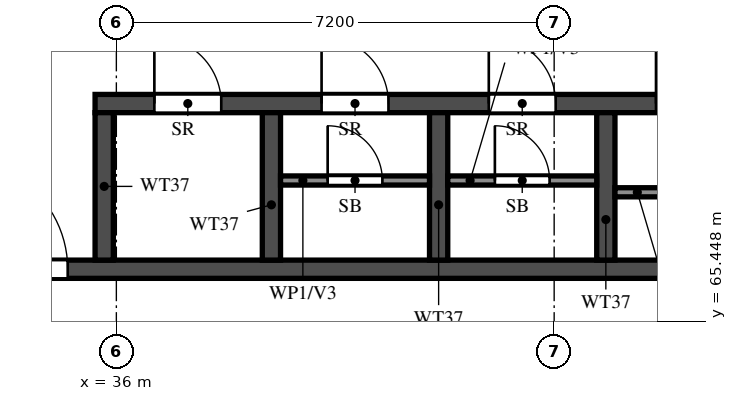
"""IFC4 building model, lengths in metres.
Left out: names, types, materials, properties, quantities, classifications, styles, units other than length and angle.
Written with IfcOpenShell. Run it as: python <this file> out.ifc"""

import sys

from ifc_helpers import new_model, si_unit, direction, frame, frame_2d, origin, place, context, subcontext, project, spatial, rectangle, extrude, element, fill, save


model = new_model("IFC4")
c1 = context("Model", 3, precision=1e-05, world=origin(), true_north=direction((0.0, 1.0)))
c2 = subcontext(c1, "Body", "Model", "MODEL_VIEW")
j1 = project(units=[si_unit("LENGTHUNIT", "METRE"), si_unit("PLANEANGLEUNIT", "RADIAN")], contexts=[c1])
p1 = place(None, origin())
s1 = spatial("IfcSite", under=j1, at=p1, CompositionType="ELEMENT")
p2 = place(p1, origin())
s2 = spatial("IfcBuilding", under=s1, at=p2, CompositionType="ELEMENT")
p3 = place(p2, frame((0.0, 0.0, 260.5)))
s3 = spatial("IfcBuildingStorey", under=s2, at=p3, CompositionType="ELEMENT", Elevation=260.5)
p4 = place(p3, frame((29.2, 66.3, 0.0), z_axis=(0.0, 0.0, 1.0), x_axis=(1.0, 0.0, 0.0)))
e1 = element("IfcWall", 1, at=p4, inside=s3, PredefinedType="SHEAR", context=c2, shape_type="SweptSolid", body=[
    extrude(rectangle(XDim=42.4, YDim=0.3, at=frame_2d((21.2, 0.0))), origin(), (0.0, 0.0, 1.0), 3.22),
])
p5 = place(p4, frame((1.425, 0.0, 0.0)))
e2 = element("IfcOpeningElement", 2, at=p5, cuts=e1, PredefinedType="OPENING", context=c2, shape_type="SweptSolid", body=[
    extrude(rectangle(XDim=1.1, YDim=2.1, at=frame_2d((0.55, 1.05))), frame((0.0, 0.16, 0.0), z_axis=(0.0, -1.0, 0.0), x_axis=(1.0, 0.0, 0.0)), (0.0, 0.0, 1.0), 0.32),
])
p6 = place(p4, frame((4.2, 0.0, 0.0)))
e3 = element("IfcOpeningElement", 3, at=p6, cuts=e1, PredefinedType="OPENING", context=c2, shape_type="SweptSolid", body=[
    extrude(rectangle(XDim=1.8, YDim=2.1, at=frame_2d((0.9, 1.05))), frame((0.0, 0.16, 0.0), z_axis=(0.0, -1.0, 0.0), x_axis=(1.0, 0.0, 0.0)), (0.0, 0.0, 1.0), 0.32),
])
p7 = place(p3, frame((35.65, 69.025, 0.0), z_axis=(0.0, 0.0, 1.0), x_axis=(1.0, 0.0, 0.0)))
e4 = element("IfcWall", 4, at=p7, inside=s3, PredefinedType="SHEAR", context=c2, shape_type="SweptSolid", body=[
    extrude(rectangle(XDim=24.05, YDim=0.3, at=frame_2d((12.025, 0.0))), origin(), (0.0, 0.0, 1.0), 3.22),
])
p8 = place(p7, frame((0.975, 0.0, 0.0)))
e5 = element("IfcOpeningElement", 5, at=p8, cuts=e4, PredefinedType="OPENING", context=c2, shape_type="SweptSolid", body=[
    extrude(rectangle(XDim=1.1, YDim=2.1, at=frame_2d((0.55, 1.05))), frame((0.0, 0.16, 0.0), z_axis=(0.0, -1.0, 0.0), x_axis=(1.0, 0.0, 0.0)), (0.0, 0.0, 1.0), 0.32),
])
p9 = place(p7, frame((3.725, 0.0, 0.0)))
e6 = element("IfcOpeningElement", 6, at=p9, cuts=e4, PredefinedType="OPENING", context=c2, shape_type="SweptSolid", body=[
    extrude(rectangle(XDim=1.1, YDim=2.1, at=frame_2d((0.55, 1.05))), frame((0.0, 0.16, 0.0), z_axis=(0.0, -1.0, 0.0), x_axis=(1.0, 0.0, 0.0)), (0.0, 0.0, 1.0), 0.32),
])
p10 = place(p7, frame((6.475, 0.0, 0.0)))
e7 = element("IfcOpeningElement", 7, at=p10, cuts=e4, PredefinedType="OPENING", context=c2, shape_type="SweptSolid", body=[
    extrude(rectangle(XDim=1.1, YDim=2.1, at=frame_2d((0.55, 1.05))), frame((0.0, 0.16, 0.0), z_axis=(0.0, -1.0, 0.0), x_axis=(1.0, 0.0, 0.0)), (0.0, 0.0, 1.0), 0.32),
])
p11 = place(p7, frame((9.225, 0.0, 0.0)))
e8 = element("IfcOpeningElement", 8, at=p11, cuts=e4, PredefinedType="OPENING", context=c2, shape_type="SweptSolid", body=[
    extrude(rectangle(XDim=1.1, YDim=2.1, at=frame_2d((0.55, 1.05))), frame((0.0, 0.16, 0.0), z_axis=(0.0, -1.0, 0.0), x_axis=(1.0, 0.0, 0.0)), (0.0, 0.0, 1.0), 0.32),
])
p12 = place(p7, frame((11.975, 0.0, 0.0)))
e9 = element("IfcOpeningElement", 9, at=p12, cuts=e4, PredefinedType="OPENING", context=c2, shape_type="SweptSolid", body=[
    extrude(rectangle(XDim=1.1, YDim=2.1, at=frame_2d((0.55, 1.05))), frame((0.0, 0.16, 0.0), z_axis=(0.0, -1.0, 0.0), x_axis=(1.0, 0.0, 0.0)), (0.0, 0.0, 1.0), 0.32),
])
p13 = place(p7, frame((14.725, 0.0, 0.0)))
e10 = element("IfcOpeningElement", 10, at=p13, cuts=e4, PredefinedType="OPENING", context=c2, shape_type="SweptSolid", body=[
    extrude(rectangle(XDim=1.1, YDim=2.1, at=frame_2d((0.55, 1.05))), frame((0.0, 0.16, 0.0), z_axis=(0.0, -1.0, 0.0), x_axis=(1.0, 0.0, 0.0)), (0.0, 0.0, 1.0), 0.32),
])
p14 = place(p7, frame((17.6, 0.0, 0.0)))
e11 = element("IfcOpeningElement", 11, at=p14, cuts=e4, PredefinedType="OPENING", context=c2, shape_type="SweptSolid", body=[
    extrude(rectangle(XDim=1.1, YDim=2.1, at=frame_2d((0.55, 1.05))), frame((0.0, 0.16, 0.0), z_axis=(0.0, -1.0, 0.0), x_axis=(1.0, 0.0, 0.0)), (0.0, 0.0, 1.0), 0.32),
])
p15 = place(p7, frame((20.6, 0.0, 0.0)))
e12 = element("IfcOpeningElement", 12, at=p15, cuts=e4, PredefinedType="OPENING", context=c2, shape_type="SweptSolid", body=[
    extrude(rectangle(XDim=1.1, YDim=2.1, at=frame_2d((0.55, 1.05))), frame((0.0, 0.16, 0.0), z_axis=(0.0, -1.0, 0.0), x_axis=(1.0, 0.0, 0.0)), (0.0, 0.0, 1.0), 0.32),
])
for number, where, z_axis, x_axis in (
    (13, (35.8, 66.45, 0.0), (0.0, 0.0, 1.0), (0.0, 1.0, 0.0)),
    (14, (38.55, 66.45, 0.0), (0.0, 0.0, 1.0), (0.0, 1.0, 0.0)),
    (15, (41.3, 66.45, 0.0), (0.0, 0.0, 1.0), (0.0, 1.0, 0.0)),
    (16, (44.05, 66.45, 0.0), (0.0, 0.0, 1.0), (0.0, 1.0, 0.0)),
):
    element("IfcWall", number, at=place(p3, frame(where, z_axis=z_axis, x_axis=x_axis)), inside=s3, PredefinedType="SHEAR", context=c2, shape_type="SweptSolid", body=[
        extrude(rectangle(XDim=2.425, YDim=0.3, at=frame_2d((1.212, 0.0))), origin(), (0.0, 0.0, 1.0), 3.22),
    ])
p16 = place(p3, frame((38.7, 67.76, 0.0), z_axis=(0.0, 0.0, 1.0), x_axis=(1.0, 0.0, 0.0)))
e17 = element("IfcWall", 17, at=p16, inside=s3, PredefinedType="PARTITIONING", context=c2, shape_type="SweptSolid", body=[
    extrude(rectangle(XDim=2.45, YDim=0.15, at=frame_2d((1.225, 0.0))), origin(), (0.0, 0.0, 1.0), 3.22),
])
p17 = place(p16, frame((0.775, 0.0, 0.0)))
e18 = element("IfcOpeningElement", 18, at=p17, cuts=e17, PredefinedType="OPENING", context=c2, shape_type="SweptSolid", body=[
    extrude(rectangle(XDim=0.9, YDim=2.1, at=frame_2d((0.45, 1.05))), frame((0.0, 0.085, 0.0), z_axis=(0.0, -1.0, 0.0), x_axis=(1.0, 0.0, 0.0)), (0.0, 0.0, 1.0), 0.17),
])
p18 = place(p3, frame((41.45, 67.76, 0.0), z_axis=(0.0, 0.0, 1.0), x_axis=(1.0, 0.0, 0.0)))
e19 = element("IfcWall", 19, at=p18, inside=s3, PredefinedType="PARTITIONING", context=c2, shape_type="SweptSolid", body=[
    extrude(rectangle(XDim=2.45, YDim=0.15, at=frame_2d((1.225, 0.0))), origin(), (0.0, 0.0, 1.0), 3.22),
])
p19 = place(p18, frame((0.775, 0.0, 0.0)))
e20 = element("IfcOpeningElement", 20, at=p19, cuts=e19, PredefinedType="OPENING", context=c2, shape_type="SweptSolid", body=[
    extrude(rectangle(XDim=0.9, YDim=2.1, at=frame_2d((0.45, 1.05))), frame((0.0, 0.085, 0.0), z_axis=(0.0, -1.0, 0.0), x_axis=(1.0, 0.0, 0.0)), (0.0, 0.0, 1.0), 0.17),
])
p20 = place(p3, frame((44.2, 67.565, 0.0), z_axis=(0.0, 0.0, 1.0), x_axis=(1.0, 0.0, 0.0)))
e21 = element("IfcWall", 21, at=p20, inside=s3, PredefinedType="PARTITIONING", context=c2, shape_type="SweptSolid", body=[
    extrude(rectangle(XDim=2.45, YDim=0.15, at=frame_2d((1.225, 0.0))), origin(), (0.0, 0.0, 1.0), 3.22),
])
p21 = place(p20, frame((0.775, 0.0, 0.0)))
e22 = element("IfcOpeningElement", 22, at=p21, cuts=e21, PredefinedType="OPENING", context=c2, shape_type="SweptSolid", body=[
    extrude(rectangle(XDim=0.9, YDim=2.1, at=frame_2d((0.45, 1.05))), frame((0.0, 0.085, 0.0), z_axis=(0.0, -1.0, 0.0), x_axis=(1.0, 0.0, 0.0)), (0.0, 0.0, 1.0), 0.17),
])
p22 = place(p6, origin())
e23 = element("IfcDoor", 23, at=p22, inside=s3, OperationType="DOUBLE_DOOR_SINGLE_SWING", PredefinedType="DOOR", context=c2, shape_type="SweptSolid", body=[
    extrude(rectangle(XDim=1.8, YDim=2.1, at=frame_2d((0.9, 1.05))), frame((0.0, 0.025, 0.0), z_axis=(0.0, -1.0, 0.0), x_axis=(1.0, 0.0, 0.0)), (0.0, 0.0, 1.0), 0.05),
])
fill(e3, e23)
p23 = place(p8, origin())
e24 = element("IfcDoor", 24, at=p23, inside=s3, OperationType="SINGLE_SWING_RIGHT", PredefinedType="DOOR", context=c2, shape_type="SweptSolid", body=[
    extrude(rectangle(XDim=1.1, YDim=2.1, at=frame_2d((0.55, 1.05))), frame((0.0, 0.025, 0.0), z_axis=(0.0, -1.0, 0.0), x_axis=(1.0, 0.0, 0.0)), (0.0, 0.0, 1.0), 0.05),
])
fill(e5, e24)
p24 = place(p9, origin())
e25 = element("IfcDoor", 25, at=p24, inside=s3, OperationType="SINGLE_SWING_LEFT", PredefinedType="DOOR", context=c2, shape_type="SweptSolid", body=[
    extrude(rectangle(XDim=1.1, YDim=2.1, at=frame_2d((0.55, 1.05))), frame((0.0, 0.025, 0.0), z_axis=(0.0, -1.0, 0.0), x_axis=(1.0, 0.0, 0.0)), (0.0, 0.0, 1.0), 0.05),
])
fill(e6, e25)
p25 = place(p17, origin())
e26 = element("IfcDoor", 26, at=p25, inside=s3, OperationType="SINGLE_SWING_RIGHT", PredefinedType="DOOR", context=c2, shape_type="SweptSolid", body=[
    extrude(rectangle(XDim=0.9, YDim=2.1, at=frame_2d((0.45, 1.05))), frame((0.0, 0.025, 0.0), z_axis=(0.0, -1.0, 0.0), x_axis=(1.0, 0.0, 0.0)), (0.0, 0.0, 1.0), 0.05),
])
fill(e18, e26)
p26 = place(p10, origin())
e27 = element("IfcDoor", 27, at=p26, inside=s3, OperationType="SINGLE_SWING_RIGHT", PredefinedType="DOOR", context=c2, shape_type="SweptSolid", body=[
    extrude(rectangle(XDim=1.1, YDim=2.1, at=frame_2d((0.55, 1.05))), frame((0.0, 0.025, 0.0), z_axis=(0.0, -1.0, 0.0), x_axis=(1.0, 0.0, 0.0)), (0.0, 0.0, 1.0), 0.05),
])
fill(e7, e27)
p27 = place(p19, origin())
e28 = element("IfcDoor", 28, at=p27, inside=s3, OperationType="SINGLE_SWING_LEFT", PredefinedType="DOOR", context=c2, shape_type="SweptSolid", body=[
    extrude(rectangle(XDim=0.9, YDim=2.1, at=frame_2d((0.45, 1.05))), frame((0.0, 0.025, 0.0), z_axis=(0.0, -1.0, 0.0), x_axis=(1.0, 0.0, 0.0)), (0.0, 0.0, 1.0), 0.05),
])
fill(e20, e28)
p28 = place(p11, origin())
e29 = element("IfcDoor", 29, at=p28, inside=s3, OperationType="SINGLE_SWING_LEFT", PredefinedType="DOOR", context=c2, shape_type="SweptSolid", body=[
    extrude(rectangle(XDim=1.1, YDim=2.1, at=frame_2d((0.55, 1.05))), frame((0.0, 0.025, 0.0), z_axis=(0.0, -1.0, 0.0), x_axis=(1.0, 0.0, 0.0)), (0.0, 0.0, 1.0), 0.05),
])
fill(e8, e29)
save(model, sys.argv[1])
